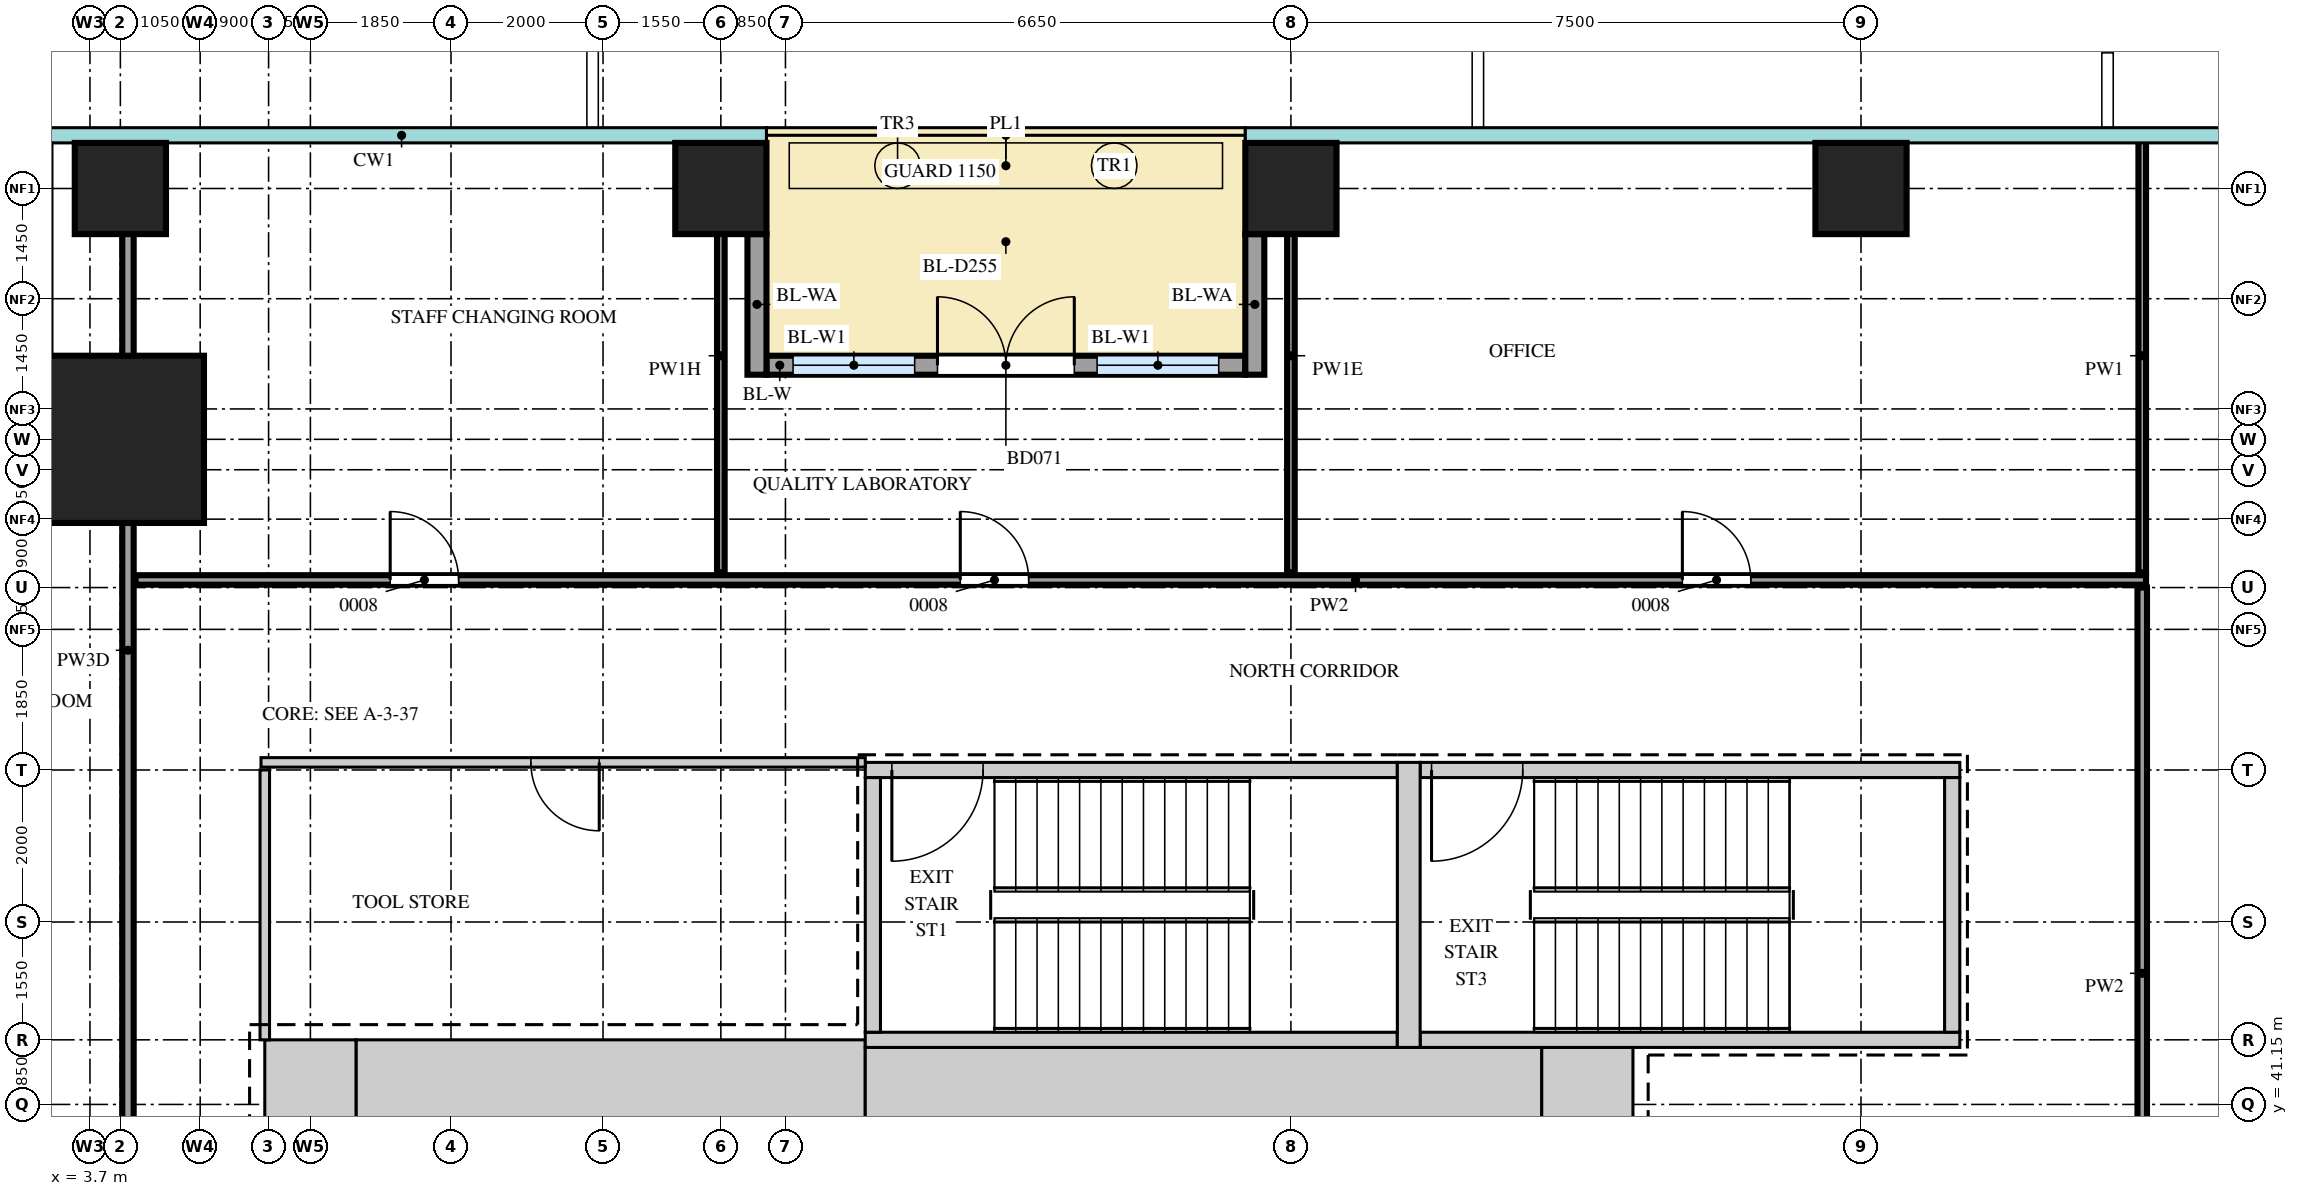
"""IFC4 building model, lengths in metres.
Left out: names, types, materials, properties, quantities, classifications, styles, units other than length and angle.
Written with IfcOpenShell. Run it as: python <this file> out.ifc"""

import sys

from ifc_helpers import new_model, si_unit, direction, frame, frame_2d, origin, origin_2d, place, context, subcontext, project, spatial, rectangle, extrude, source, transform, mapped, element, fill, save


model = new_model("IFC4")
c1 = context("Model", 3, precision=1e-05, world=origin(), true_north=direction((0.0, 1.0)))
c2 = subcontext(c1, "Body", "Model", "MODEL_VIEW")
j1 = project(units=[si_unit("LENGTHUNIT", "METRE"), si_unit("PLANEANGLEUNIT", "RADIAN")], contexts=[c1])
p1 = place(None, origin())
s1 = spatial("IfcSite", under=j1, at=p1, CompositionType="ELEMENT")
p2 = place(p1, origin())
s2 = spatial("IfcBuilding", under=s1, at=p2, CompositionType="ELEMENT")
p3 = place(p2, frame((0.0, 0.0, 37.5)))
s3 = spatial("IfcBuildingStorey", under=s2, at=p3, CompositionType="ELEMENT", Elevation=37.5)
m1 = source(origin(), c2, "Body", "SweptSolid", [
    extrude(rectangle(XDim=6.7, YDim=1.2, at=frame_2d((3.35, 0.0))), origin(), (0.0, 0.0, 1.0), 4.2),
])
p4 = place(p3, frame((7.2, 41.4, 0.0), z_axis=(0.0, 0.0, 1.0), x_axis=(1.0, 0.0, 0.0)))
e1 = element("IfcWall", 1, at=p4, inside=s3, PredefinedType="SHEAR", context=c2, shape_type="MappedRepresentation", body=[
    mapped(m1, transform((0.0, 0.0, 0.0))),
])
m2 = source(origin(), c2, "Body", "SweptSolid", [
    extrude(rectangle(XDim=8.9, YDim=1.1, at=frame_2d((4.45, 0.0))), origin(), (0.0, 0.0, 1.0), 4.2),
])
p5 = place(p3, frame((13.9, 41.35, 0.0), z_axis=(0.0, 0.0, 1.0), x_axis=(1.0, 0.0, 0.0)))
e2 = element("IfcWall", 2, at=p5, inside=s3, PredefinedType="SHEAR", context=c2, shape_type="MappedRepresentation", body=[
    mapped(m2, transform((0.0, 0.0, 0.0))),
])
m3 = source(origin(), c2, "Body", "SweptSolid", [
    extrude(rectangle(XDim=1.2, YDim=1.1, at=frame_2d((0.6, 0.0))), origin(), (0.0, 0.0, 1.0), 4.2),
])
p6 = place(p3, frame((22.8, 41.35, 0.0), z_axis=(0.0, 0.0, 1.0), x_axis=(1.0, 0.0, 0.0)))
e3 = element("IfcWall", 3, at=p6, inside=s3, PredefinedType="SHEAR", context=c2, shape_type="MappedRepresentation", body=[
    mapped(m3, transform((0.0, 0.0, 0.0))),
])
m4 = source(origin(), c2, "Body", "SweptSolid", [
    extrude(rectangle(XDim=1.2, YDim=1.2, at=frame_2d((0.6, 0.0))), origin(), (0.0, 0.0, 1.0), 4.2),
])
p7 = place(p3, frame((6.0, 41.4, 0.0), z_axis=(0.0, 0.0, 1.0), x_axis=(1.0, 0.0, 0.0)))
e4 = element("IfcWall", 4, at=p7, inside=s3, PredefinedType="SHEAR", context=c2, shape_type="MappedRepresentation", body=[
    mapped(m4, transform((0.0, 0.0, 0.0))),
])
m5 = source(origin(), c2, "Body", "SweptSolid", [
    extrude(rectangle(XDim=7.0, YDim=0.2, at=frame_2d((3.5, 0.0))), origin(), (0.0, 0.0, 1.0), 4.2),
])
p8 = place(p3, frame((13.9, 45.55, 0.0), z_axis=(0.0, 0.0, 1.0), x_axis=(1.0, 0.0, 0.0)))
e5 = element("IfcWall", 5, at=p8, inside=s3, PredefinedType="SHEAR", context=c2, shape_type="MappedRepresentation", body=[
    mapped(m5, transform((0.0, 0.0, 0.0))),
])
m6 = source(origin(), c2, "Body", "SweptSolid", [
    extrude(rectangle(XDim=1.2, YDim=2.1, at=frame_2d((0.6, 1.05))), frame((0.0, 0.11, 0.0), z_axis=(0.0, -1.0, 0.0), x_axis=(1.0, 0.0, 0.0)), (0.0, 0.0, 1.0), 0.22),
])
p9 = place(p8, frame((0.35, 0.0, 0.0)))
e6 = element("IfcOpeningElement", 6, at=p9, cuts=e5, PredefinedType="OPENING", context=c2, shape_type="MappedRepresentation", body=[
    mapped(m6, transform((0.0, 0.0, 0.0))),
])
p10 = place(p3, frame((13.9, 42.0, 0.0), z_axis=(0.0, 0.0, 1.0), x_axis=(1.0, 0.0, 0.0)))
e7 = element("IfcWall", 7, at=p10, inside=s3, PredefinedType="SHEAR", context=c2, shape_type="MappedRepresentation", body=[
    mapped(m5, transform((0.0, 0.0, 0.0))),
])
m7 = source(origin(), c2, "Body", "SweptSolid", [
    extrude(rectangle(XDim=7.1, YDim=0.2, at=frame_2d((3.55, 0.0))), origin(), (0.0, 0.0, 1.0), 4.2),
])
p11 = place(p3, frame((21.2, 45.55, 0.0), z_axis=(0.0, 0.0, 1.0), x_axis=(1.0, 0.0, 0.0)))
e8 = element("IfcWall", 8, at=p11, inside=s3, PredefinedType="SHEAR", context=c2, shape_type="MappedRepresentation", body=[
    mapped(m7, transform((0.0, 0.0, 0.0))),
])
p12 = place(p11, frame((0.15, 0.0, 0.0)))
e9 = element("IfcOpeningElement", 9, at=p12, cuts=e8, PredefinedType="OPENING", context=c2, shape_type="MappedRepresentation", body=[
    mapped(m6, transform((0.0, 0.0, 0.0))),
])
p13 = place(p3, frame((21.2, 42.0, 0.0), z_axis=(0.0, 0.0, 1.0), x_axis=(1.0, 0.0, 0.0)))
e10 = element("IfcWall", 10, at=p13, inside=s3, PredefinedType="SHEAR", context=c2, shape_type="MappedRepresentation", body=[
    mapped(m7, transform((0.0, 0.0, 0.0))),
])
m8 = source(origin(), c2, "Body", "SweptSolid", [
    extrude(rectangle(XDim=3.75, YDim=0.3, at=frame_2d((1.875, 0.0))), origin(), (0.0, 0.0, 1.0), 4.2),
])
p14 = place(p3, frame((21.05, 41.9, 0.0), z_axis=(0.0, 0.0, 1.0), x_axis=(0.0, 1.0, 0.0)))
e11 = element("IfcWall", 11, at=p14, inside=s3, PredefinedType="SHEAR", context=c2, shape_type="MappedRepresentation", body=[
    mapped(m8, transform((0.0, 0.0, 0.0))),
])
m9 = source(origin(), c2, "Body", "SweptSolid", [
    extrude(rectangle(XDim=3.35, YDim=0.2, at=frame_2d((1.675, 0.0))), origin(), (0.0, 0.0, 1.0), 4.2),
])
for number, where, z_axis, x_axis in (
    (12, (14.0, 42.1, 0.0), (0.0, 0.0, 1.0), (0.0, 1.0, 0.0)),
    (13, (28.2, 42.1, 0.0), (0.0, 0.0, 1.0), (0.0, 1.0, 0.0)),
):
    element("IfcWall", number, at=place(p3, frame(where, z_axis=z_axis, x_axis=x_axis)), inside=s3, PredefinedType="SHEAR", context=c2, shape_type="MappedRepresentation", body=[
        mapped(m9, transform((0.0, 0.0, 0.0))),
    ])
m10 = source(origin(), c2, "Body", "SweptSolid", [
    extrude(rectangle(XDim=2.2, YDim=2.2, at=origin_2d()), origin(), (0.0, 0.0, 1.0), 4.5),
])
p15 = place(p3, frame((4.1, 49.9, 0.0), z_axis=(0.0, 0.0, 1.0), x_axis=(1.0, 0.0, 0.0)))
e14 = element("IfcColumn", 14, at=p15, inside=s3, PredefinedType="COLUMN", context=c2, shape_type="MappedRepresentation", body=[
    mapped(m10, transform((0.0, 0.0, 0.0))),
])
m11 = source(origin(), c2, "Body", "SweptSolid", [
    extrude(rectangle(XDim=1.2, YDim=1.2, at=origin_2d()), origin(), (0.0, 0.0, 1.0), 4.2),
])
for number, where, z_axis, x_axis in (
    (15, (4.1, 53.2, 0.0), (0.0, 0.0, 1.0), (1.0, 0.0, 0.0)),
    (16, (12.0, 53.2, 0.0), (0.0, 0.0, 1.0), (1.0, 0.0, 0.0)),
    (17, (19.5, 53.2, 0.0), (0.0, 0.0, 1.0), (1.0, 0.0, 0.0)),
    (18, (27.0, 53.2, 0.0), (0.0, 0.0, 1.0), (1.0, 0.0, 0.0)),
):
    element("IfcColumn", number, at=place(p3, frame(where, z_axis=z_axis, x_axis=x_axis)), inside=s3, PredefinedType="COLUMN", context=c2, shape_type="MappedRepresentation", body=[
        mapped(m11, transform((0.0, 0.0, 0.0))),
    ])
m12 = source(origin(), c2, "Body", "SweptSolid", [
    extrude(rectangle(XDim=6.3, YDim=0.25, at=frame_2d((3.15, 0.0))), origin(), (0.0, 0.0, 1.0), 4.2),
])
p16 = place(p3, frame((12.6, 50.875, 0.0), z_axis=(0.0, 0.0, 1.0), x_axis=(1.0, 0.0, 0.0)))
e19 = element("IfcWall", 19, at=p16, inside=s3, PredefinedType="SOLIDWALL", context=c2, shape_type="MappedRepresentation", body=[
    mapped(m12, transform((0.0, 0.0, 0.0))),
])
m13 = source(origin(), c2, "Body", "SweptSolid", [
    extrude(rectangle(XDim=1.6, YDim=2.4, at=frame_2d((0.8, 1.2))), frame((0.0, 0.135, 0.0), z_axis=(0.0, -1.0, 0.0), x_axis=(1.0, 0.0, 0.0)), (0.0, 0.0, 1.0), 0.27),
])
p17 = place(p16, frame((0.35, 0.0, 0.0)))
e20 = element("IfcOpeningElement", 20, at=p17, cuts=e19, PredefinedType="OPENING", context=c2, shape_type="MappedRepresentation", body=[
    mapped(m13, transform((0.0, 0.0, 0.0))),
])
p18 = place(p16, frame((4.35, 0.0, 0.0)))
e21 = element("IfcOpeningElement", 21, at=p18, cuts=e19, PredefinedType="OPENING", context=c2, shape_type="MappedRepresentation", body=[
    mapped(m13, transform((0.0, 0.0, 0.0))),
])
m14 = source(origin(), c2, "Body", "SweptSolid", [
    extrude(rectangle(XDim=1.8, YDim=2.4, at=frame_2d((0.9, 1.2))), frame((0.0, 0.135, 0.0), z_axis=(0.0, -1.0, 0.0), x_axis=(1.0, 0.0, 0.0)), (0.0, 0.0, 1.0), 0.27),
])
p19 = place(p16, frame((2.25, 0.0, 0.0)))
e22 = element("IfcOpeningElement", 22, at=p19, cuts=e19, PredefinedType="OPENING", context=c2, shape_type="MappedRepresentation", body=[
    mapped(m14, transform((0.0, 0.0, 0.0))),
])
m15 = source(origin(), c2, "Body", "SweptSolid", [
    extrude(rectangle(XDim=1.85, YDim=0.25, at=frame_2d((0.925, 0.0))), origin(), (0.0, 0.0, 1.0), 3.9),
])
for number, where, z_axis, x_axis in (
    (23, (12.475, 52.6, 0.0), (0.0, 0.0, 1.0), (0.0, -1.0, 0.0)),
    (24, (19.025, 52.6, 0.0), (0.0, 0.0, 1.0), (0.0, -1.0, 0.0)),
):
    element("IfcWall", number, at=place(p3, frame(where, z_axis=z_axis, x_axis=x_axis)), inside=s3, PredefinedType="SOLIDWALL", context=c2, shape_type="MappedRepresentation", body=[
        mapped(m15, transform((0.0, 0.0, 0.0))),
    ])
m16 = source(origin(), c2, "Body", "SweptSolid", [
    extrude(rectangle(XDim=19.75, YDim=0.15, at=frame_2d((9.875, 0.0))), origin(), (0.0, 0.0, 1.0), 3.6),
])
p20 = place(p3, frame((4.2, 34.1, 0.0), z_axis=(0.0, 0.0, 1.0), x_axis=(0.0, 1.0, 0.0)))
e25 = element("IfcWall", 25, at=p20, inside=s3, PredefinedType="PARTITIONING", context=c2, shape_type="MappedRepresentation", body=[
    mapped(m16, transform((0.0, 0.0, 0.0))),
])
m17 = source(origin(), c2, "Body", "SweptSolid", [
    extrude(rectangle(XDim=0.9, YDim=2.1, at=frame_2d((0.45, 1.05))), frame((0.0, 0.085, 0.0), z_axis=(0.0, -1.0, 0.0), x_axis=(1.0, 0.0, 0.0)), (0.0, 0.0, 1.0), 0.17),
])
p21 = place(p20, frame((5.4, 0.0, 0.0)))
e26 = element("IfcOpeningElement", 26, at=p21, cuts=e25, PredefinedType="OPENING", context=c2, shape_type="MappedRepresentation", body=[
    mapped(m17, transform((0.0, 0.0, 0.0))),
])
m18 = source(origin(), c2, "Body", "SweptSolid", [
    extrude(rectangle(XDim=10.15, YDim=0.125, at=frame_2d((5.075, 0.0))), origin(), (0.0, 0.0, 1.0), 4.3),
])
p22 = place(p3, frame((30.7, 37.8, 0.0), z_axis=(0.0, 0.0, 1.0), x_axis=(0.0, 1.0, 0.0)))
e27 = element("IfcWall", 27, at=p22, inside=s3, PredefinedType="PARTITIONING", context=c2, shape_type="MappedRepresentation", body=[
    mapped(m18, transform((0.0, 0.0, 0.0))),
])
m19 = source(origin(), c2, "Body", "SweptSolid", [
    extrude(rectangle(XDim=3.55, YDim=0.125, at=frame_2d((1.775, 0.0))), origin(), (0.0, 0.0, 1.0), 4.3),
])
p23 = place(p3, frame((6.0, 42.0, 0.0), z_axis=(0.0, 0.0, 1.0), x_axis=(0.0, 1.0, 0.0)))
e28 = element("IfcWall", 28, at=p23, inside=s3, PredefinedType="PARTITIONING", context=c2, shape_type="MappedRepresentation", body=[
    mapped(m19, transform((0.0, 0.0, 0.0))),
])
m20 = source(origin(), c2, "Body", "SweptSolid", [
    extrude(rectangle(XDim=7.95, YDim=0.125, at=frame_2d((3.975, 0.0))), origin(), (0.0, 0.0, 1.0), 4.3),
])
p24 = place(p3, frame((5.95, 45.65, 0.0), z_axis=(0.0, 0.0, 1.0), x_axis=(1.0, 0.0, 0.0)))
e29 = element("IfcWall", 29, at=p24, inside=s3, PredefinedType="PARTITIONING", context=c2, shape_type="MappedRepresentation", body=[
    mapped(m20, transform((0.0, 0.0, 0.0))),
])
m21 = source(origin(), c2, "Body", "SweptSolid", [
    extrude(rectangle(XDim=0.9, YDim=2.1, at=frame_2d((0.45, 1.05))), frame((0.0, 0.073, 0.0), z_axis=(0.0, -1.0, 0.0), x_axis=(1.0, 0.0, 0.0)), (0.0, 0.0, 1.0), 0.145),
])
p25 = place(p24, frame((3.55, 0.0, 0.0)))
e30 = element("IfcOpeningElement", 30, at=p25, cuts=e29, PredefinedType="OPENING", context=c2, shape_type="MappedRepresentation", body=[
    mapped(m21, transform((0.0, 0.0, 0.0))),
])
m22 = source(origin(), c2, "Body", "SweptSolid", [
    extrude(rectangle(XDim=26.45, YDim=0.125, at=frame_2d((13.225, 0.0))), origin(), (0.0, 0.0, 1.0), 4.3),
])
p26 = place(p3, frame((4.3, 48.05, 0.0), z_axis=(0.0, 0.0, 1.0), x_axis=(1.0, 0.0, 0.0)))
e31 = element("IfcWall", 31, at=p26, inside=s3, PredefinedType="PARTITIONING", context=c2, shape_type="MappedRepresentation", body=[
    mapped(m22, transform((0.0, 0.0, 0.0))),
])
p27 = place(p26, frame((3.35, 0.0, 0.0)))
e32 = element("IfcOpeningElement", 32, at=p27, cuts=e31, PredefinedType="OPENING", context=c2, shape_type="MappedRepresentation", body=[
    mapped(m21, transform((0.0, 0.0, 0.0))),
])
p28 = place(p26, frame((10.85, 0.0, 0.0)))
e33 = element("IfcOpeningElement", 33, at=p28, cuts=e31, PredefinedType="OPENING", context=c2, shape_type="MappedRepresentation", body=[
    mapped(m21, transform((0.0, 0.0, 0.0))),
])
p29 = place(p26, frame((20.35, 0.0, 0.0)))
e34 = element("IfcOpeningElement", 34, at=p29, cuts=e31, PredefinedType="OPENING", context=c2, shape_type="MappedRepresentation", body=[
    mapped(m21, transform((0.0, 0.0, 0.0))),
])
m23 = source(origin(), c2, "Body", "SweptSolid", [
    extrude(rectangle(XDim=5.7, YDim=0.1, at=frame_2d((2.85, 0.0))), origin(), (0.0, 0.0, 1.0), 3.7),
])
p30 = place(p3, frame((12.0, 48.15, 0.0), z_axis=(0.0, 0.0, 1.0), x_axis=(0.0, 1.0, 0.0)))
e35 = element("IfcWall", 35, at=p30, inside=s3, PredefinedType="PARTITIONING", context=c2, shape_type="MappedRepresentation", body=[
    mapped(m23, transform((0.0, 0.0, 0.0))),
])
m24 = source(origin(), c2, "Body", "SweptSolid", [
    extrude(rectangle(XDim=5.7, YDim=0.1, at=frame_2d((2.85, 0.0))), origin(), (0.0, 0.0, 1.0), 3.84),
])
p31 = place(p3, frame((19.5, 48.15, 0.0), z_axis=(0.0, 0.0, 1.0), x_axis=(0.0, 1.0, 0.0)))
e36 = element("IfcWall", 36, at=p31, inside=s3, PredefinedType="PARTITIONING", context=c2, shape_type="MappedRepresentation", body=[
    mapped(m24, transform((0.0, 0.0, 0.0))),
])
m25 = source(origin(), c2, "Body", "SweptSolid", [
    extrude(rectangle(XDim=5.7, YDim=0.1, at=frame_2d((2.85, 0.0))), origin(), (0.0, 0.0, 1.0), 4.3),
])
p32 = place(p3, frame((30.7, 48.15, 0.0), z_axis=(0.0, 0.0, 1.0), x_axis=(0.0, 1.0, 0.0)))
e37 = element("IfcWall", 37, at=p32, inside=s3, PredefinedType="PARTITIONING", context=c2, shape_type="MappedRepresentation", body=[
    mapped(m25, transform((0.0, 0.0, 0.0))),
])
m26 = source(origin(), c2, "Body", "SweptSolid", [
    extrude(rectangle(XDim=1.6, YDim=2.4, at=frame_2d((0.8, 1.2))), frame((0.0, 0.03, 0.0), z_axis=(0.0, -1.0, 0.0), x_axis=(1.0, 0.0, 0.0)), (0.0, 0.0, 1.0), 0.06),
])
p33 = place(p17, origin())
e38 = element("IfcWindow", 38, at=p33, inside=s3, PartitioningType="SINGLE_PANEL", PredefinedType="WINDOW", context=c2, shape_type="MappedRepresentation", body=[
    mapped(m26, transform((0.0, 0.0, 0.0))),
])
fill(e20, e38)
p34 = place(p18, origin())
e39 = element("IfcWindow", 39, at=p34, inside=s3, PartitioningType="SINGLE_PANEL", PredefinedType="WINDOW", context=c2, shape_type="MappedRepresentation", body=[
    mapped(m26, transform((0.0, 0.0, 0.0))),
])
fill(e21, e39)
m27 = source(origin(), c2, "Body", "SweptSolid", [
    extrude(rectangle(XDim=1.8, YDim=2.4, at=frame_2d((0.9, 1.2))), frame((0.0, 0.025, 0.0), z_axis=(0.0, -1.0, 0.0), x_axis=(1.0, 0.0, 0.0)), (0.0, 0.0, 1.0), 0.05),
])
p35 = place(p19, origin())
e40 = element("IfcDoor", 40, at=p35, inside=s3, OperationType="DOUBLE_DOOR_DOUBLE_SWING", PredefinedType="DOOR", context=c2, shape_type="MappedRepresentation", body=[
    mapped(m27, transform((0.0, 0.0, 0.0))),
])
fill(e22, e40)
m28 = source(origin(), c2, "Body", "SweptSolid", [
    extrude(rectangle(XDim=0.9, YDim=2.1, at=frame_2d((0.45, 1.05))), frame((0.0, 0.025, 0.0), z_axis=(0.0, -1.0, 0.0), x_axis=(1.0, 0.0, 0.0)), (0.0, 0.0, 1.0), 0.05),
])
p36 = place(p27, origin())
e41 = element("IfcDoor", 41, at=p36, inside=s3, OperationType="SINGLE_SWING_RIGHT", PredefinedType="DOOR", context=c2, shape_type="MappedRepresentation", body=[
    mapped(m28, transform((0.0, 0.0, 0.0))),
])
fill(e32, e41)
p37 = place(p28, origin())
e42 = element("IfcDoor", 42, at=p37, inside=s3, OperationType="SINGLE_SWING_RIGHT", PredefinedType="DOOR", context=c2, shape_type="MappedRepresentation", body=[
    mapped(m28, transform((0.0, 0.0, 0.0))),
])
fill(e33, e42)
p38 = place(p29, origin())
e43 = element("IfcDoor", 43, at=p38, inside=s3, OperationType="SINGLE_SWING_RIGHT", PredefinedType="DOOR", context=c2, shape_type="MappedRepresentation", body=[
    mapped(m28, transform((0.0, 0.0, 0.0))),
])
fill(e34, e43)
p39 = place(p25, origin())
e44 = element("IfcDoor", 44, at=p39, inside=s3, OperationType="SINGLE_SWING_RIGHT", PredefinedType="DOOR", context=c2, shape_type="MappedRepresentation", body=[
    mapped(m28, transform((0.0, 0.0, 0.0))),
])
fill(e30, e44)
m29 = source(origin(), c2, "Body", "SweptSolid", [
    extrude(rectangle(XDim=1.2, YDim=2.1, at=frame_2d((0.6, 1.05))), frame((0.0, 0.025, 0.0), z_axis=(0.0, -1.0, 0.0), x_axis=(1.0, 0.0, 0.0)), (0.0, 0.0, 1.0), 0.05),
])
p40 = place(p9, origin())
e45 = element("IfcDoor", 45, at=p40, inside=s3, OperationType="SINGLE_SWING_LEFT", PredefinedType="DOOR", context=c2, shape_type="MappedRepresentation", body=[
    mapped(m29, transform((0.0, 0.0, 0.0))),
])
fill(e6, e45)
p41 = place(p12, origin())
e46 = element("IfcDoor", 46, at=p41, inside=s3, OperationType="SINGLE_SWING_LEFT", PredefinedType="DOOR", context=c2, shape_type="MappedRepresentation", body=[
    mapped(m29, transform((0.0, 0.0, 0.0))),
])
fill(e9, e46)
save(model, sys.argv[1])
